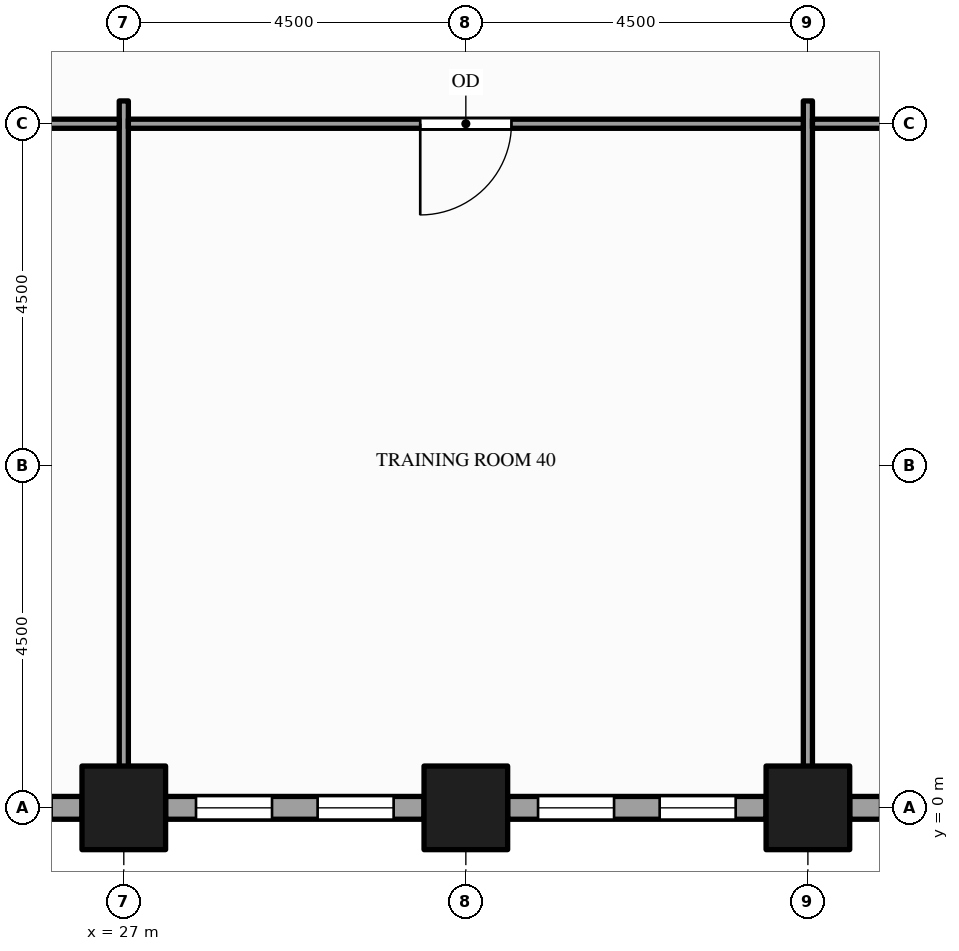
"""IFC4 building model, lengths in metres.
Left out: names, types, materials, properties, quantities, classifications, styles, units other than length and angle.
Written with IfcOpenShell. Run it as: python <this file> out.ifc"""

import sys

from ifc_helpers import new_model, si_unit, direction, frame, frame_2d, origin, origin_2d, place, context, subcontext, project, spatial, rectangle, hollow_rectangle, extrude, element, fill, save


model = new_model("IFC4")
c1 = context("Model", 3, precision=1e-05, world=origin(), true_north=direction((0.0, 1.0)))
c2 = subcontext(c1, "Body", "Model", "MODEL_VIEW")
j1 = project(units=[si_unit("LENGTHUNIT", "METRE"), si_unit("PLANEANGLEUNIT", "RADIAN")], contexts=[c1])
p1 = place(None, origin())
s1 = spatial("IfcSite", under=j1, at=p1, CompositionType="ELEMENT")
p2 = place(p1, origin())
s2 = spatial("IfcBuilding", under=s1, at=p2, CompositionType="ELEMENT")
p3 = place(p2, frame((0.0, 0.0, 14.0)))
s3 = spatial("IfcBuildingStorey", under=s2, at=p3, CompositionType="ELEMENT", Elevation=14.0)
for number, where, z_axis, x_axis in (
    (1, (27.0, 0.0, -0.25), (0.0, 0.0, 1.0), (1.0, 0.0, 0.0)),
    (2, (31.5, 0.0, -0.25), (0.0, 0.0, 1.0), (1.0, 0.0, 0.0)),
    (3, (36.0, 0.0, -0.25), (0.0, 0.0, 1.0), (1.0, 0.0, 0.0)),
):
    element("IfcColumn", number, at=place(p3, frame(where, z_axis=z_axis, x_axis=x_axis)), inside=s3, PredefinedType="COLUMN", context=c2, shape_type="SweptSolid", body=[
        extrude(hollow_rectangle(XDim=1.1, YDim=1.1, WallThickness=0.06, at=origin_2d()), origin(), (0.0, 0.0, 1.0), 5.0),
    ])
p4 = place(p3, frame((23.05, 0.0, 0.0), z_axis=(0.0, 0.0, 1.0), x_axis=(1.0, 0.0, 0.0)))
e4 = element("IfcWall", 4, at=p4, inside=s3, PredefinedType="STANDARD", context=c2, shape_type="SweptSolid", body=[
    extrude(rectangle(XDim=3.4, YDim=0.3, at=frame_2d((1.7, 0.0))), origin(), (0.0, 0.0, 1.0), 4.036),
])
p5 = place(p4, frame((0.4, 0.0, 0.9)))
e5 = element("IfcOpeningElement", 5, at=p5, cuts=e4, PredefinedType="OPENING", context=c2, shape_type="SweptSolid", body=[
    extrude(rectangle(XDim=1.0, YDim=2.75, at=frame_2d((0.5, 1.375))), frame((0.0, 0.16, 0.0), z_axis=(0.0, -1.0, 0.0), x_axis=(1.0, 0.0, 0.0)), (0.0, 0.0, 1.0), 0.32),
])
p6 = place(p4, frame((2.0, 0.0, 0.9)))
e6 = element("IfcOpeningElement", 6, at=p6, cuts=e4, PredefinedType="OPENING", context=c2, shape_type="SweptSolid", body=[
    extrude(rectangle(XDim=1.0, YDim=2.75, at=frame_2d((0.5, 1.375))), frame((0.0, 0.16, 0.0), z_axis=(0.0, -1.0, 0.0), x_axis=(1.0, 0.0, 0.0)), (0.0, 0.0, 1.0), 0.32),
])
p7 = place(p3, frame((27.55, 0.0, 0.0), z_axis=(0.0, 0.0, 1.0), x_axis=(1.0, 0.0, 0.0)))
e7 = element("IfcWall", 7, at=p7, inside=s3, PredefinedType="STANDARD", context=c2, shape_type="SweptSolid", body=[
    extrude(rectangle(XDim=3.4, YDim=0.3, at=frame_2d((1.7, 0.0))), origin(), (0.0, 0.0, 1.0), 4.036),
])
p8 = place(p7, frame((0.4, 0.0, 0.9)))
e8 = element("IfcOpeningElement", 8, at=p8, cuts=e7, PredefinedType="OPENING", context=c2, shape_type="SweptSolid", body=[
    extrude(rectangle(XDim=1.0, YDim=2.75, at=frame_2d((0.5, 1.375))), frame((0.0, 0.16, 0.0), z_axis=(0.0, -1.0, 0.0), x_axis=(1.0, 0.0, 0.0)), (0.0, 0.0, 1.0), 0.32),
])
p9 = place(p7, frame((2.0, 0.0, 0.9)))
e9 = element("IfcOpeningElement", 9, at=p9, cuts=e7, PredefinedType="OPENING", context=c2, shape_type="SweptSolid", body=[
    extrude(rectangle(XDim=1.0, YDim=2.75, at=frame_2d((0.5, 1.375))), frame((0.0, 0.16, 0.0), z_axis=(0.0, -1.0, 0.0), x_axis=(1.0, 0.0, 0.0)), (0.0, 0.0, 1.0), 0.32),
])
p10 = place(p3, frame((32.05, 0.0, 0.0), z_axis=(0.0, 0.0, 1.0), x_axis=(1.0, 0.0, 0.0)))
e10 = element("IfcWall", 10, at=p10, inside=s3, PredefinedType="STANDARD", context=c2, shape_type="SweptSolid", body=[
    extrude(rectangle(XDim=3.4, YDim=0.3, at=frame_2d((1.7, 0.0))), origin(), (0.0, 0.0, 1.0), 4.036),
])
p11 = place(p10, frame((0.4, 0.0, 0.9)))
e11 = element("IfcOpeningElement", 11, at=p11, cuts=e10, PredefinedType="OPENING", context=c2, shape_type="SweptSolid", body=[
    extrude(rectangle(XDim=1.0, YDim=2.75, at=frame_2d((0.5, 1.375))), frame((0.0, 0.16, 0.0), z_axis=(0.0, -1.0, 0.0), x_axis=(1.0, 0.0, 0.0)), (0.0, 0.0, 1.0), 0.32),
])
p12 = place(p10, frame((2.0, 0.0, 0.9)))
e12 = element("IfcOpeningElement", 12, at=p12, cuts=e10, PredefinedType="OPENING", context=c2, shape_type="SweptSolid", body=[
    extrude(rectangle(XDim=1.0, YDim=2.75, at=frame_2d((0.5, 1.375))), frame((0.0, 0.16, 0.0), z_axis=(0.0, -1.0, 0.0), x_axis=(1.0, 0.0, 0.0)), (0.0, 0.0, 1.0), 0.32),
])
p13 = place(p3, frame((36.55, 0.0, 0.0), z_axis=(0.0, 0.0, 1.0), x_axis=(1.0, 0.0, 0.0)))
e13 = element("IfcWall", 13, at=p13, inside=s3, PredefinedType="STANDARD", context=c2, shape_type="SweptSolid", body=[
    extrude(rectangle(XDim=3.4, YDim=0.3, at=frame_2d((1.7, 0.0))), origin(), (0.0, 0.0, 1.0), 4.036),
])
p14 = place(p13, frame((0.4, 0.0, 0.9)))
e14 = element("IfcOpeningElement", 14, at=p14, cuts=e13, PredefinedType="OPENING", context=c2, shape_type="SweptSolid", body=[
    extrude(rectangle(XDim=1.0, YDim=2.75, at=frame_2d((0.5, 1.375))), frame((0.0, 0.16, 0.0), z_axis=(0.0, -1.0, 0.0), x_axis=(1.0, 0.0, 0.0)), (0.0, 0.0, 1.0), 0.32),
])
p15 = place(p13, frame((2.0, 0.0, 0.9)))
e15 = element("IfcOpeningElement", 15, at=p15, cuts=e13, PredefinedType="OPENING", context=c2, shape_type="SweptSolid", body=[
    extrude(rectangle(XDim=1.0, YDim=2.75, at=frame_2d((0.5, 1.375))), frame((0.0, 0.16, 0.0), z_axis=(0.0, -1.0, 0.0), x_axis=(1.0, 0.0, 0.0)), (0.0, 0.0, 1.0), 0.32),
])
for number, where, z_axis, x_axis in (
    (16, (27.0, 0.15, 0.0), (0.0, 0.0, 1.0), (0.0, 1.0, 0.0)),
    (17, (36.0, 0.15, 0.0), (0.0, 0.0, 1.0), (0.0, 1.0, 0.0)),
):
    element("IfcWall", number, at=place(p3, frame(where, z_axis=z_axis, x_axis=x_axis)), inside=s3, PredefinedType="PARTITIONING", context=c2, shape_type="SweptSolid", body=[
        extrude(rectangle(XDim=9.15, YDim=0.12, at=frame_2d((4.575, 0.0))), origin(), (0.0, 0.0, 1.0), 3.759),
    ])
p16 = place(p3, frame((22.56, 9.0, 0.0), z_axis=(0.0, 0.0, 1.0), x_axis=(1.0, 0.0, 0.0)))
e18 = element("IfcWall", 18, at=p16, inside=s3, PredefinedType="PARTITIONING", context=c2, shape_type="SweptSolid", body=[
    extrude(rectangle(XDim=4.38, YDim=0.12, at=frame_2d((2.19, 0.0))), origin(), (0.0, 0.0, 1.0), 3.66),
])
p17 = place(p16, frame((1.69, 0.0, 0.0)))
e19 = element("IfcOpeningElement", 19, at=p17, cuts=e18, PredefinedType="OPENING", context=c2, shape_type="SweptSolid", body=[
    extrude(rectangle(XDim=1.0, YDim=2.1, at=frame_2d((0.5, 1.05))), frame((0.0, 0.07, 0.0), z_axis=(0.0, -1.0, 0.0), x_axis=(1.0, 0.0, 0.0)), (0.0, 0.0, 1.0), 0.14),
])
p18 = place(p3, frame((27.06, 9.0, 0.0), z_axis=(0.0, 0.0, 1.0), x_axis=(1.0, 0.0, 0.0)))
e20 = element("IfcWall", 20, at=p18, inside=s3, PredefinedType="PARTITIONING", context=c2, shape_type="SweptSolid", body=[
    extrude(rectangle(XDim=8.88, YDim=0.12, at=frame_2d((4.44, 0.0))), origin(), (0.0, 0.0, 1.0), 3.66),
])
p19 = place(p18, frame((3.84, 0.0, 0.0)))
e21 = element("IfcOpeningElement", 21, at=p19, cuts=e20, PredefinedType="OPENING", context=c2, shape_type="SweptSolid", body=[
    extrude(rectangle(XDim=1.2, YDim=2.1, at=frame_2d((0.6, 1.05))), frame((0.0, 0.07, 0.0), z_axis=(0.0, -1.0, 0.0), x_axis=(1.0, 0.0, 0.0)), (0.0, 0.0, 1.0), 0.14),
])
p20 = place(p3, frame((36.06, 9.0, 0.0), z_axis=(0.0, 0.0, 1.0), x_axis=(1.0, 0.0, 0.0)))
e22 = element("IfcWall", 22, at=p20, inside=s3, PredefinedType="PARTITIONING", context=c2, shape_type="SweptSolid", body=[
    extrude(rectangle(XDim=8.88, YDim=0.12, at=frame_2d((4.44, 0.0))), origin(), (0.0, 0.0, 1.0), 3.66),
])
p21 = place(p20, frame((3.84, 0.0, 0.0)))
e23 = element("IfcOpeningElement", 23, at=p21, cuts=e22, PredefinedType="OPENING", context=c2, shape_type="SweptSolid", body=[
    extrude(rectangle(XDim=1.2, YDim=2.1, at=frame_2d((0.6, 1.05))), frame((0.0, 0.07, 0.0), z_axis=(0.0, -1.0, 0.0), x_axis=(1.0, 0.0, 0.0)), (0.0, 0.0, 1.0), 0.14),
])
p22 = place(p8, origin())
e24 = element("IfcWindow", 24, at=p22, inside=s3, PartitioningType="SINGLE_PANEL", PredefinedType="WINDOW", context=c2, shape_type="SweptSolid", body=[
    extrude(rectangle(XDim=1.0, YDim=2.75, at=frame_2d((0.5, 1.375))), frame((0.0, 0.03, 0.0), z_axis=(0.0, -1.0, 0.0), x_axis=(1.0, 0.0, 0.0)), (0.0, 0.0, 1.0), 0.06),
])
fill(e8, e24)
p23 = place(p9, origin())
e25 = element("IfcWindow", 25, at=p23, inside=s3, PartitioningType="SINGLE_PANEL", PredefinedType="WINDOW", context=c2, shape_type="SweptSolid", body=[
    extrude(rectangle(XDim=1.0, YDim=2.75, at=frame_2d((0.5, 1.375))), frame((0.0, 0.03, 0.0), z_axis=(0.0, -1.0, 0.0), x_axis=(1.0, 0.0, 0.0)), (0.0, 0.0, 1.0), 0.06),
])
fill(e9, e25)
p24 = place(p11, origin())
e26 = element("IfcWindow", 26, at=p24, inside=s3, PartitioningType="SINGLE_PANEL", PredefinedType="WINDOW", context=c2, shape_type="SweptSolid", body=[
    extrude(rectangle(XDim=1.0, YDim=2.75, at=frame_2d((0.5, 1.375))), frame((0.0, 0.03, 0.0), z_axis=(0.0, -1.0, 0.0), x_axis=(1.0, 0.0, 0.0)), (0.0, 0.0, 1.0), 0.06),
])
fill(e11, e26)
p25 = place(p12, origin())
e27 = element("IfcWindow", 27, at=p25, inside=s3, PartitioningType="SINGLE_PANEL", PredefinedType="WINDOW", context=c2, shape_type="SweptSolid", body=[
    extrude(rectangle(XDim=1.0, YDim=2.75, at=frame_2d((0.5, 1.375))), frame((0.0, 0.03, 0.0), z_axis=(0.0, -1.0, 0.0), x_axis=(1.0, 0.0, 0.0)), (0.0, 0.0, 1.0), 0.06),
])
fill(e12, e27)
p26 = place(p19, origin())
e28 = element("IfcDoor", 28, at=p26, inside=s3, OperationType="SINGLE_SWING_LEFT", PredefinedType="DOOR", context=c2, shape_type="SweptSolid", body=[
    extrude(rectangle(XDim=1.2, YDim=2.1, at=frame_2d((0.6, 1.05))), frame((0.0, 0.025, 0.0), z_axis=(0.0, -1.0, 0.0), x_axis=(1.0, 0.0, 0.0)), (0.0, 0.0, 1.0), 0.05),
])
fill(e21, e28)
save(model, sys.argv[1])
